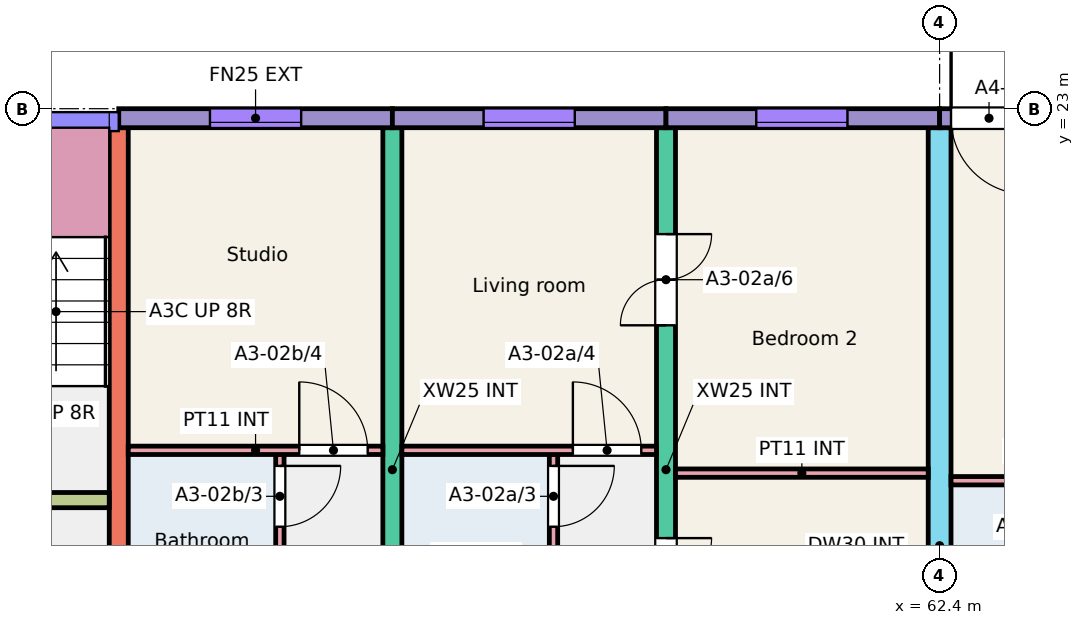
"""IFC4 building model, lengths in metres.
Left out: names, types, materials, properties, quantities, classifications, styles, units other than length and angle.
Written with IfcOpenShell. Run it as: python <this file> out.ifc"""

import sys

from ifc_helpers import new_model, si_unit, direction, frame, frame_2d, origin, place, context, subcontext, project, spatial, rectangle, extrude, element, fill, save


model = new_model("IFC4")
c1 = context("Model", 3, precision=1e-05, world=origin(), true_north=direction((0.0, 1.0)))
c2 = subcontext(c1, "Body", "Model", "MODEL_VIEW")
j1 = project(units=[si_unit("LENGTHUNIT", "METRE"), si_unit("PLANEANGLEUNIT", "RADIAN")], contexts=[c1])
p1 = place(None, origin())
s1 = spatial("IfcSite", under=j1, at=p1, CompositionType="ELEMENT")
p2 = place(p1, origin())
s2 = spatial("IfcBuilding", under=s1, at=p2, CompositionType="ELEMENT")
p3 = place(p2, frame((0.0, 0.0, 6.0)))
s3 = spatial("IfcBuildingStorey", under=s2, at=p3, CompositionType="ELEMENT", Elevation=6.0)
for number, where, z_axis, x_axis in (
    (1, (51.6, 13.75, 0.0), (0.0, 0.0, 1.0), (0.0, 1.0, 0.0)),
    (2, (55.2, 13.75, 0.0), (0.0, 0.0, 1.0), (0.0, 1.0, 0.0)),
):
    element("IfcWall", number, at=place(p3, frame(where, z_axis=z_axis, x_axis=x_axis)), inside=s3, PredefinedType="SHEAR", context=c2, shape_type="SweptSolid", body=[
        extrude(rectangle(XDim=9.0, YDim=0.25, at=frame_2d((4.5, 0.0))), origin(), (0.0, 0.0, 1.0), 3.0),
    ])
p4 = place(p3, frame((58.8, 13.75, 0.0), z_axis=(0.0, 0.0, 1.0), x_axis=(0.0, 1.0, 0.0)))
e3 = element("IfcWall", 3, at=p4, inside=s3, PredefinedType="SHEAR", context=c2, shape_type="SweptSolid", body=[
    extrude(rectangle(XDim=9.0, YDim=0.25, at=frame_2d((4.5, 0.0))), origin(), (0.0, 0.0, 1.0), 3.0),
])
p5 = place(p4, frame((2.4, 0.0, 0.0)))
e4 = element("IfcOpeningElement", 4, at=p5, cuts=e3, PredefinedType="OPENING", context=c2, shape_type="SweptSolid", body=[
    extrude(rectangle(XDim=1.2, YDim=2.1, at=frame_2d((0.6, 1.05))), frame((0.0, 0.135, 0.0), z_axis=(0.0, -1.0, 0.0), x_axis=(1.0, 0.0, 0.0)), (0.0, 0.0, 1.0), 0.27),
])
p6 = place(p4, frame((6.4, 0.0, 0.0)))
e5 = element("IfcOpeningElement", 5, at=p6, cuts=e3, PredefinedType="OPENING", context=c2, shape_type="SweptSolid", body=[
    extrude(rectangle(XDim=1.2, YDim=2.1, at=frame_2d((0.6, 1.05))), frame((0.0, 0.135, 0.0), z_axis=(0.0, -1.0, 0.0), x_axis=(1.0, 0.0, 0.0)), (0.0, 0.0, 1.0), 0.27),
])
p7 = place(p3, frame((62.4, 11.75, 0.0), z_axis=(0.0, 0.0, 1.0), x_axis=(0.0, 1.0, 0.0)))
e6 = element("IfcWall", 6, at=p7, inside=s3, PredefinedType="SHEAR", context=c2, shape_type="SweptSolid", body=[
    extrude(rectangle(XDim=11.0, YDim=0.3, at=frame_2d((5.5, 0.0))), origin(), (0.0, 0.0, 1.0), 3.0),
])
p8 = place(p7, frame((0.3, 0.0, 0.0)))
e7 = element("IfcOpeningElement", 7, at=p8, cuts=e6, PredefinedType="OPENING", context=c2, shape_type="SweptSolid", body=[
    extrude(rectangle(XDim=1.2, YDim=2.1, at=frame_2d((0.6, 1.05))), frame((0.0, 0.16, 0.0), z_axis=(0.0, -1.0, 0.0), x_axis=(1.0, 0.0, 0.0)), (0.0, 0.0, 1.0), 0.32),
])
p9 = place(p3, frame((45.75, 17.85, 0.0), z_axis=(0.0, 0.0, 1.0), x_axis=(1.0, 0.0, 0.0)))
e8 = element("IfcWall", 8, at=p9, inside=s3, PredefinedType="SHEAR", context=c2, shape_type="SweptSolid", body=[
    extrude(rectangle(XDim=5.725, YDim=0.2, at=frame_2d((2.863, 0.0))), origin(), (0.0, 0.0, 1.0), 3.0),
])
p10 = place(p9, frame((3.775, 0.0, 0.0)))
e9 = element("IfcOpeningElement", 9, at=p10, cuts=e8, PredefinedType="OPENING", context=c2, shape_type="SweptSolid", body=[
    extrude(rectangle(XDim=1.0, YDim=2.1, at=frame_2d((0.5, 1.05))), frame((0.0, 0.11, 0.0), z_axis=(0.0, -1.0, 0.0), x_axis=(1.0, 0.0, 0.0)), (0.0, 0.0, 1.0), 0.22),
])
p11 = place(p9, frame((0.762, 0.0, 0.0)))
e10 = element("IfcOpeningElement", 10, at=p11, cuts=e8, PredefinedType="OPENING", context=c2, shape_type="SweptSolid", body=[
    extrude(rectangle(XDim=1.1, YDim=2.1, at=frame_2d((0.55, 1.05))), frame((0.0, 0.11, 0.0), z_axis=(0.0, -1.0, 0.0), x_axis=(1.0, 0.0, 0.0)), (0.0, 0.0, 1.0), 0.22),
])
p12 = place(p3, frame((51.6, 22.875, 0.0), z_axis=(0.0, 0.0, 1.0), x_axis=(1.0, 0.0, 0.0)))
e11 = element("IfcWall", 11, at=p12, inside=s3, PredefinedType="SOLIDWALL", context=c2, shape_type="SweptSolid", body=[
    extrude(rectangle(XDim=3.6, YDim=0.25, at=frame_2d((1.8, 0.0))), origin(), (0.0, 0.0, 1.0), 3.0),
])
p13 = place(p12, frame((1.2, 0.0, 0.8)))
e12 = element("IfcOpeningElement", 12, at=p13, cuts=e11, PredefinedType="OPENING", context=c2, shape_type="SweptSolid", body=[
    extrude(rectangle(XDim=1.2, YDim=1.6, at=frame_2d((0.6, 0.8))), frame((0.0, 0.135, 0.0), z_axis=(0.0, -1.0, 0.0), x_axis=(1.0, 0.0, 0.0)), (0.0, 0.0, 1.0), 0.27),
])
p14 = place(p3, frame((55.2, 22.875, 0.0), z_axis=(0.0, 0.0, 1.0), x_axis=(1.0, 0.0, 0.0)))
e13 = element("IfcWall", 13, at=p14, inside=s3, PredefinedType="SOLIDWALL", context=c2, shape_type="SweptSolid", body=[
    extrude(rectangle(XDim=3.6, YDim=0.25, at=frame_2d((1.8, 0.0))), origin(), (0.0, 0.0, 1.0), 3.0),
])
p15 = place(p14, frame((1.2, 0.0, 0.8)))
e14 = element("IfcOpeningElement", 14, at=p15, cuts=e13, PredefinedType="OPENING", context=c2, shape_type="SweptSolid", body=[
    extrude(rectangle(XDim=1.2, YDim=1.6, at=frame_2d((0.6, 0.8))), frame((0.0, 0.135, 0.0), z_axis=(0.0, -1.0, 0.0), x_axis=(1.0, 0.0, 0.0)), (0.0, 0.0, 1.0), 0.27),
])
p16 = place(p3, frame((58.8, 22.875, 0.0), z_axis=(0.0, 0.0, 1.0), x_axis=(1.0, 0.0, 0.0)))
e15 = element("IfcWall", 15, at=p16, inside=s3, PredefinedType="SOLIDWALL", context=c2, shape_type="SweptSolid", body=[
    extrude(rectangle(XDim=3.6, YDim=0.25, at=frame_2d((1.8, 0.0))), origin(), (0.0, 0.0, 1.0), 3.0),
])
p17 = place(p16, frame((1.188, 0.0, 0.8)))
e16 = element("IfcOpeningElement", 16, at=p17, cuts=e15, PredefinedType="OPENING", context=c2, shape_type="SweptSolid", body=[
    extrude(rectangle(XDim=1.2, YDim=1.6, at=frame_2d((0.6, 0.8))), frame((0.0, 0.135, 0.0), z_axis=(0.0, -1.0, 0.0), x_axis=(1.0, 0.0, 0.0)), (0.0, 0.0, 1.0), 0.27),
])
p18 = place(p3, frame((62.4, 22.875, 0.0), z_axis=(0.0, 0.0, 1.0), x_axis=(1.0, 0.0, 0.0)))
e17 = element("IfcWall", 17, at=p18, inside=s3, PredefinedType="SOLIDWALL", context=c2, shape_type="SweptSolid", body=[
    extrude(rectangle(XDim=3.6, YDim=0.25, at=frame_2d((1.8, 0.0))), origin(), (0.0, 0.0, 1.0), 3.0),
])
p19 = place(p18, frame((1.762, 0.0, 0.8)))
e18 = element("IfcOpeningElement", 18, at=p19, cuts=e17, PredefinedType="OPENING", context=c2, shape_type="SweptSolid", body=[
    extrude(rectangle(XDim=1.2, YDim=1.6, at=frame_2d((0.6, 0.8))), frame((0.0, 0.135, 0.0), z_axis=(0.0, -1.0, 0.0), x_axis=(1.0, 0.0, 0.0)), (0.0, 0.0, 1.0), 0.27),
])
p20 = place(p18, frame((0.15, 0.0, 0.0)))
e19 = element("IfcOpeningElement", 19, at=p20, cuts=e17, PredefinedType="OPENING", context=c2, shape_type="SweptSolid", body=[
    extrude(rectangle(XDim=1.0, YDim=2.1, at=frame_2d((0.5, 1.05))), frame((0.0, 0.135, 0.0), z_axis=(0.0, -1.0, 0.0), x_axis=(1.0, 0.0, 0.0)), (0.0, 0.0, 1.0), 0.27),
])
p21 = place(p3, frame((57.32, 13.75, 0.0), z_axis=(0.0, 0.0, 1.0), x_axis=(0.0, 1.0, 0.0)))
e20 = element("IfcWall", 20, at=p21, inside=s3, PredefinedType="PARTITIONING", context=c2, shape_type="SweptSolid", body=[
    extrude(rectangle(XDim=4.7, YDim=0.11, at=frame_2d((2.35, 0.0))), origin(), (0.0, 0.0, 1.0), 2.8),
])
p22 = place(p21, frame((0.2, 0.0, 0.0)))
e21 = element("IfcOpeningElement", 21, at=p22, cuts=e20, PredefinedType="OPENING", context=c2, shape_type="SweptSolid", body=[
    extrude(rectangle(XDim=0.8, YDim=2.1, at=frame_2d((0.4, 1.05))), frame((0.0, 0.065, 0.0), z_axis=(0.0, -1.0, 0.0), x_axis=(1.0, 0.0, 0.0)), (0.0, 0.0, 1.0), 0.13),
])
p23 = place(p21, frame((3.75, 0.0, 0.0)))
e22 = element("IfcOpeningElement", 22, at=p23, cuts=e20, PredefinedType="OPENING", context=c2, shape_type="SweptSolid", body=[
    extrude(rectangle(XDim=0.8, YDim=2.1, at=frame_2d((0.4, 1.05))), frame((0.0, 0.065, 0.0), z_axis=(0.0, -1.0, 0.0), x_axis=(1.0, 0.0, 0.0)), (0.0, 0.0, 1.0), 0.13),
])
p24 = place(p3, frame((55.325, 18.505, 0.0), z_axis=(0.0, 0.0, 1.0), x_axis=(1.0, 0.0, 0.0)))
e23 = element("IfcWall", 23, at=p24, inside=s3, PredefinedType="PARTITIONING", context=c2, shape_type="SweptSolid", body=[
    extrude(rectangle(XDim=3.35, YDim=0.11, at=frame_2d((1.675, 0.0))), origin(), (0.0, 0.0, 1.0), 2.8),
])
p25 = place(p24, frame((2.25, 0.0, 0.0)))
e24 = element("IfcOpeningElement", 24, at=p25, cuts=e23, PredefinedType="OPENING", context=c2, shape_type="SweptSolid", body=[
    extrude(rectangle(XDim=0.9, YDim=2.1, at=frame_2d((0.45, 1.05))), frame((0.0, 0.065, 0.0), z_axis=(0.0, -1.0, 0.0), x_axis=(1.0, 0.0, 0.0)), (0.0, 0.0, 1.0), 0.13),
])
p26 = place(p3, frame((58.925, 18.205, 0.0), z_axis=(0.0, 0.0, 1.0), x_axis=(1.0, 0.0, 0.0)))
e25 = element("IfcWall", 25, at=p26, inside=s3, PredefinedType="PARTITIONING", context=c2, shape_type="SweptSolid", body=[
    extrude(rectangle(XDim=3.325, YDim=0.11, at=frame_2d((1.663, 0.0))), origin(), (0.0, 0.0, 1.0), 2.8),
])
p27 = place(p3, frame((53.72, 13.75, 0.0), z_axis=(0.0, 0.0, 1.0), x_axis=(0.0, 1.0, 0.0)))
e26 = element("IfcWall", 26, at=p27, inside=s3, PredefinedType="PARTITIONING", context=c2, shape_type="SweptSolid", body=[
    extrude(rectangle(XDim=4.7, YDim=0.11, at=frame_2d((2.35, 0.0))), origin(), (0.0, 0.0, 1.0), 2.8),
])
p28 = place(p27, frame((0.2, 0.0, 0.0)))
e27 = element("IfcOpeningElement", 27, at=p28, cuts=e26, PredefinedType="OPENING", context=c2, shape_type="SweptSolid", body=[
    extrude(rectangle(XDim=0.8, YDim=2.1, at=frame_2d((0.4, 1.05))), frame((0.0, 0.065, 0.0), z_axis=(0.0, -1.0, 0.0), x_axis=(1.0, 0.0, 0.0)), (0.0, 0.0, 1.0), 0.13),
])
p29 = place(p27, frame((3.75, 0.0, 0.0)))
e28 = element("IfcOpeningElement", 28, at=p29, cuts=e26, PredefinedType="OPENING", context=c2, shape_type="SweptSolid", body=[
    extrude(rectangle(XDim=0.8, YDim=2.1, at=frame_2d((0.4, 1.05))), frame((0.0, 0.065, 0.0), z_axis=(0.0, -1.0, 0.0), x_axis=(1.0, 0.0, 0.0)), (0.0, 0.0, 1.0), 0.13),
])
p30 = place(p3, frame((51.725, 18.505, 0.0), z_axis=(0.0, 0.0, 1.0), x_axis=(1.0, 0.0, 0.0)))
e29 = element("IfcWall", 29, at=p30, inside=s3, PredefinedType="PARTITIONING", context=c2, shape_type="SweptSolid", body=[
    extrude(rectangle(XDim=3.35, YDim=0.11, at=frame_2d((1.675, 0.0))), origin(), (0.0, 0.0, 1.0), 2.8),
])
p31 = place(p30, frame((2.25, 0.0, 0.0)))
e30 = element("IfcOpeningElement", 30, at=p31, cuts=e29, PredefinedType="OPENING", context=c2, shape_type="SweptSolid", body=[
    extrude(rectangle(XDim=0.9, YDim=2.1, at=frame_2d((0.45, 1.05))), frame((0.0, 0.065, 0.0), z_axis=(0.0, -1.0, 0.0), x_axis=(1.0, 0.0, 0.0)), (0.0, 0.0, 1.0), 0.13),
])
p32 = place(p3, frame((62.55, 18.105, 0.0), z_axis=(0.0, 0.0, 1.0), x_axis=(1.0, 0.0, 0.0)))
e31 = element("IfcWall", 31, at=p32, inside=s3, PredefinedType="PARTITIONING", context=c2, shape_type="SweptSolid", body=[
    extrude(rectangle(XDim=3.325, YDim=0.11, at=frame_2d((1.663, 0.0))), origin(), (0.0, 0.0, 1.0), 2.8),
])
p33 = place(p32, frame((2.225, 0.0, 0.0)))
e32 = element("IfcOpeningElement", 32, at=p33, cuts=e31, PredefinedType="OPENING", context=c2, shape_type="SweptSolid", body=[
    extrude(rectangle(XDim=0.9, YDim=2.1, at=frame_2d((0.45, 1.05))), frame((0.0, 0.065, 0.0), z_axis=(0.0, -1.0, 0.0), x_axis=(1.0, 0.0, 0.0)), (0.0, 0.0, 1.0), 0.13),
])
p34 = place(p17, origin())
e33 = element("IfcWindow", 33, at=p34, inside=s3, PartitioningType="SINGLE_PANEL", PredefinedType="WINDOW", context=c2, shape_type="SweptSolid", body=[
    extrude(rectangle(XDim=1.2, YDim=1.6, at=frame_2d((0.6, 0.8))), frame((0.0, -0.025, 0.0), z_axis=(0.0, -1.0, 0.0), x_axis=(1.0, 0.0, 0.0)), (0.0, 0.0, 1.0), 0.06),
])
fill(e16, e33)
p35 = place(p15, origin())
e34 = element("IfcWindow", 34, at=p35, inside=s3, PartitioningType="SINGLE_PANEL", PredefinedType="WINDOW", context=c2, shape_type="SweptSolid", body=[
    extrude(rectangle(XDim=1.2, YDim=1.6, at=frame_2d((0.6, 0.8))), frame((0.0, -0.025, 0.0), z_axis=(0.0, -1.0, 0.0), x_axis=(1.0, 0.0, 0.0)), (0.0, 0.0, 1.0), 0.06),
])
fill(e14, e34)
p36 = place(p13, origin())
e35 = element("IfcWindow", 35, at=p36, inside=s3, PartitioningType="SINGLE_PANEL", PredefinedType="WINDOW", context=c2, shape_type="SweptSolid", body=[
    extrude(rectangle(XDim=1.2, YDim=1.6, at=frame_2d((0.6, 0.8))), frame((0.0, -0.025, 0.0), z_axis=(0.0, -1.0, 0.0), x_axis=(1.0, 0.0, 0.0)), (0.0, 0.0, 1.0), 0.06),
])
fill(e12, e35)
p37 = place(p23, origin())
e36 = element("IfcDoor", 36, at=p37, inside=s3, OperationType="SINGLE_SWING_RIGHT", PredefinedType="DOOR", context=c2, shape_type="SweptSolid", body=[
    extrude(rectangle(XDim=0.8, YDim=2.1, at=frame_2d((0.4, 1.05))), frame((0.0, 0.025, 0.0), z_axis=(0.0, -1.0, 0.0), x_axis=(1.0, 0.0, 0.0)), (0.0, 0.0, 1.0), 0.05),
])
fill(e22, e36)
p38 = place(p25, origin())
e37 = element("IfcDoor", 37, at=p38, inside=s3, OperationType="SINGLE_SWING_LEFT", PredefinedType="DOOR", context=c2, shape_type="SweptSolid", body=[
    extrude(rectangle(XDim=0.9, YDim=2.1, at=frame_2d((0.45, 1.05))), frame((0.0, 0.025, 0.0), z_axis=(0.0, -1.0, 0.0), x_axis=(1.0, 0.0, 0.0)), (0.0, 0.0, 1.0), 0.05),
])
fill(e24, e37)
p39 = place(p5, origin())
e38 = element("IfcDoor", 38, at=p39, inside=s3, OperationType="DOUBLE_DOOR_SINGLE_SWING", PredefinedType="DOOR", context=c2, shape_type="SweptSolid", body=[
    extrude(rectangle(XDim=1.2, YDim=2.1, at=frame_2d((0.6, 1.05))), frame((0.0, 0.025, 0.0), z_axis=(0.0, -1.0, 0.0), x_axis=(1.0, 0.0, 0.0)), (0.0, 0.0, 1.0), 0.05),
])
fill(e4, e38)
p40 = place(p6, origin())
e39 = element("IfcDoor", 39, at=p40, inside=s3, OperationType="DOUBLE_DOOR_SINGLE_SWING", PredefinedType="DOOR", context=c2, shape_type="SweptSolid", body=[
    extrude(rectangle(XDim=1.2, YDim=2.1, at=frame_2d((0.6, 1.05))), frame((0.0, 0.025, 0.0), z_axis=(0.0, -1.0, 0.0), x_axis=(1.0, 0.0, 0.0)), (0.0, 0.0, 1.0), 0.05),
])
fill(e5, e39)
p41 = place(p29, origin())
e40 = element("IfcDoor", 40, at=p41, inside=s3, OperationType="SINGLE_SWING_RIGHT", PredefinedType="DOOR", context=c2, shape_type="SweptSolid", body=[
    extrude(rectangle(XDim=0.8, YDim=2.1, at=frame_2d((0.4, 1.05))), frame((0.0, 0.025, 0.0), z_axis=(0.0, -1.0, 0.0), x_axis=(1.0, 0.0, 0.0)), (0.0, 0.0, 1.0), 0.05),
])
fill(e28, e40)
p42 = place(p31, origin())
e41 = element("IfcDoor", 41, at=p42, inside=s3, OperationType="SINGLE_SWING_LEFT", PredefinedType="DOOR", context=c2, shape_type="SweptSolid", body=[
    extrude(rectangle(XDim=0.9, YDim=2.1, at=frame_2d((0.45, 1.05))), frame((0.0, 0.025, 0.0), z_axis=(0.0, -1.0, 0.0), x_axis=(1.0, 0.0, 0.0)), (0.0, 0.0, 1.0), 0.05),
])
fill(e30, e41)
p43 = place(p20, origin())
e42 = element("IfcDoor", 42, at=p43, inside=s3, OperationType="SINGLE_SWING_RIGHT", PredefinedType="DOOR", context=c2, shape_type="SweptSolid", body=[
    extrude(rectangle(XDim=1.0, YDim=2.1, at=frame_2d((0.5, 1.05))), frame((0.0, 0.025, 0.0), z_axis=(0.0, -1.0, 0.0), x_axis=(1.0, 0.0, 0.0)), (0.0, 0.0, 1.0), 0.05),
])
fill(e19, e42)
save(model, sys.argv[1])
